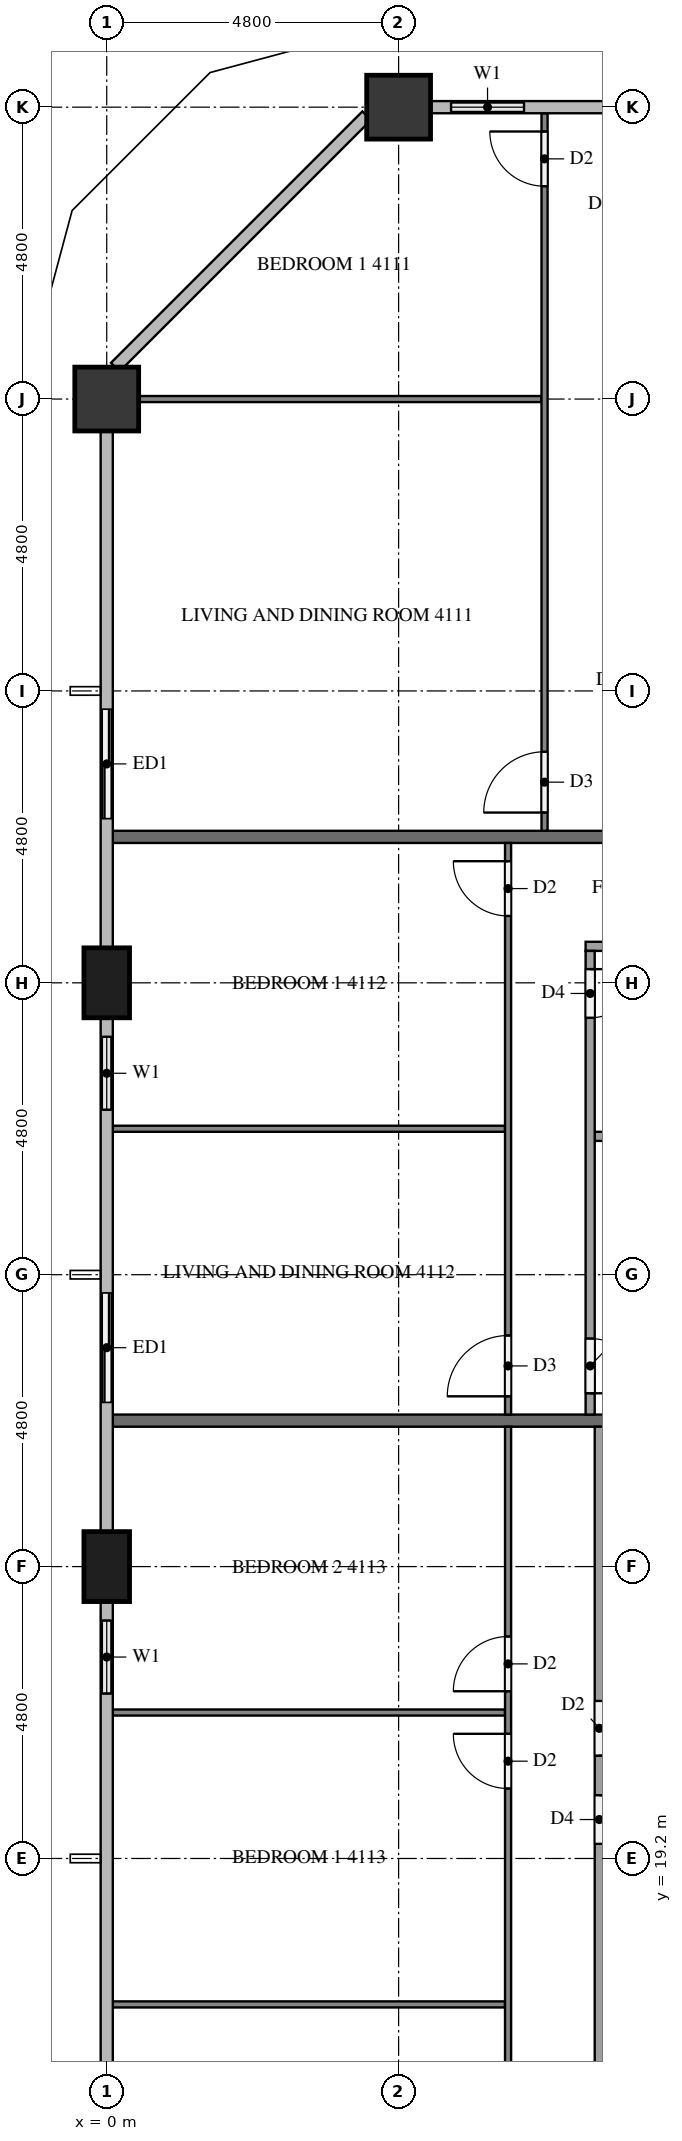
"""IFC4 building model, lengths in metres.
Left out: names, types, materials, properties, quantities, classifications, styles, units other than length and angle.
Written with IfcOpenShell. Run it as: python <this file> out.ifc"""

import sys

from ifc_helpers import new_model, si_unit, direction, frame, frame_2d, origin, origin_2d, place, context, subcontext, project, spatial, rectangle, extrude, element, fill, save


model = new_model("IFC4")
c1 = context("Model", 3, precision=1e-05, world=origin(), true_north=direction((0.0, 1.0)))
c2 = subcontext(c1, "Body", "Model", "MODEL_VIEW")
j1 = project(units=[si_unit("LENGTHUNIT", "METRE"), si_unit("PLANEANGLEUNIT", "RADIAN")], contexts=[c1])
p1 = place(None, origin())
s1 = spatial("IfcSite", under=j1, at=p1, CompositionType="ELEMENT")
p2 = place(p1, origin())
s2 = spatial("IfcBuilding", under=s1, at=p2, CompositionType="ELEMENT")
p3 = place(p2, frame((0.0, 0.0, 159.5)))
s3 = spatial("IfcBuildingStorey", under=s2, at=p3, CompositionType="ELEMENT", Elevation=159.5)
for number, where, z_axis, x_axis in (
    (1, (4.8, 48.0, 0.0), (0.0, 0.0, 1.0), (1.0, 0.0, 0.0)),
    (2, (0.0, 43.2, 0.0), (0.0, 0.0, 1.0), (1.0, 0.0, 0.0)),
):
    element("IfcColumn", number, at=place(p3, frame(where, z_axis=z_axis, x_axis=x_axis)), inside=s3, PredefinedType="COLUMN", context=c2, shape_type="SweptSolid", body=[
        extrude(rectangle(XDim=1.05, YDim=1.05, at=origin_2d()), origin(), (0.0, 0.0, 1.0), 3.2),
    ])
for number, where, z_axis, x_axis in (
    (3, (0.0, 33.6, 0.0), (0.0, 0.0, 1.0), (0.0, 1.0, 0.0)),
    (4, (0.0, 24.0, 0.0), (0.0, 0.0, 1.0), (0.0, 1.0, 0.0)),
):
    element("IfcColumn", number, at=place(p3, frame(where, z_axis=z_axis, x_axis=x_axis)), inside=s3, PredefinedType="COLUMN", context=c2, shape_type="SweptSolid", body=[
        extrude(rectangle(XDim=1.15, YDim=0.75, at=origin_2d()), origin(), (0.0, 0.0, 1.0), 3.2),
    ])
p4 = place(p3, frame((7.2, 48.0, 0.0), z_axis=(0.0, 0.0, 1.0), x_axis=(-1.0, 0.0, 0.0)))
e5 = element("IfcWall", 5, at=p4, inside=s3, PredefinedType="SOLIDWALL", context=c2, shape_type="SweptSolid", body=[
    extrude(rectangle(XDim=1.875, YDim=0.15, at=frame_2d((0.938, 0.0))), origin(), (0.0, 0.0, 1.0), 3.2),
])
p5 = place(p4, frame((0.337, 0.0, 0.9)))
e6 = element("IfcOpeningElement", 6, at=p5, cuts=e5, PredefinedType="OPENING", context=c2, shape_type="SweptSolid", body=[
    extrude(rectangle(XDim=1.2, YDim=1.4, at=frame_2d((0.6, 0.7))), frame((0.0, 0.085, 0.0), z_axis=(0.0, -1.0, 0.0), x_axis=(1.0, 0.0, 0.0)), (0.0, 0.0, 1.0), 0.17),
])
p6 = place(p3, frame((0.0, 38.4, 0.0), z_axis=(0.0, 0.0, 1.0), x_axis=(0.0, -1.0, 0.0)))
e7 = element("IfcWall", 7, at=p6, inside=s3, PredefinedType="SOLIDWALL", context=c2, shape_type="SweptSolid", body=[
    extrude(rectangle(XDim=2.4, YDim=0.15, at=frame_2d((1.2, 0.0))), origin(), (0.0, 0.0, 1.0), 3.2),
])
p7 = place(p6, frame((0.3, 0.0, 0.0)))
e8 = element("IfcOpeningElement", 8, at=p7, cuts=e7, PredefinedType="OPENING", context=c2, shape_type="SweptSolid", body=[
    extrude(rectangle(XDim=1.8, YDim=2.4, at=frame_2d((0.9, 1.2))), frame((0.0, 0.085, 0.0), z_axis=(0.0, -1.0, 0.0), x_axis=(1.0, 0.0, 0.0)), (0.0, 0.0, 1.0), 0.17),
])
p8 = place(p3, frame((0.0, 33.025, 0.0), z_axis=(0.0, 0.0, 1.0), x_axis=(0.0, -1.0, 0.0)))
e9 = element("IfcWall", 9, at=p8, inside=s3, PredefinedType="SOLIDWALL", context=c2, shape_type="SweptSolid", body=[
    extrude(rectangle(XDim=1.825, YDim=0.15, at=frame_2d((0.913, 0.0))), origin(), (0.0, 0.0, 1.0), 3.2),
])
p9 = place(p8, frame((0.312, 0.0, 0.9)))
e10 = element("IfcOpeningElement", 10, at=p9, cuts=e9, PredefinedType="OPENING", context=c2, shape_type="SweptSolid", body=[
    extrude(rectangle(XDim=1.2, YDim=1.4, at=frame_2d((0.6, 0.7))), frame((0.0, 0.085, 0.0), z_axis=(0.0, -1.0, 0.0), x_axis=(1.0, 0.0, 0.0)), (0.0, 0.0, 1.0), 0.17),
])
p10 = place(p3, frame((0.0, 28.8, 0.0), z_axis=(0.0, 0.0, 1.0), x_axis=(0.0, -1.0, 0.0)))
e11 = element("IfcWall", 11, at=p10, inside=s3, PredefinedType="SOLIDWALL", context=c2, shape_type="SweptSolid", body=[
    extrude(rectangle(XDim=2.4, YDim=0.15, at=frame_2d((1.2, 0.0))), origin(), (0.0, 0.0, 1.0), 3.2),
])
p11 = place(p10, frame((0.3, 0.0, 0.0)))
e12 = element("IfcOpeningElement", 12, at=p11, cuts=e11, PredefinedType="OPENING", context=c2, shape_type="SweptSolid", body=[
    extrude(rectangle(XDim=1.8, YDim=2.4, at=frame_2d((0.9, 1.2))), frame((0.0, 0.085, 0.0), z_axis=(0.0, -1.0, 0.0), x_axis=(1.0, 0.0, 0.0)), (0.0, 0.0, 1.0), 0.17),
])
p12 = place(p3, frame((0.0, 23.425, 0.0), z_axis=(0.0, 0.0, 1.0), x_axis=(0.0, -1.0, 0.0)))
e13 = element("IfcWall", 13, at=p12, inside=s3, PredefinedType="SOLIDWALL", context=c2, shape_type="SweptSolid", body=[
    extrude(rectangle(XDim=1.825, YDim=0.15, at=frame_2d((0.913, 0.0))), origin(), (0.0, 0.0, 1.0), 3.2),
])
p13 = place(p12, frame((0.312, 0.0, 0.9)))
e14 = element("IfcOpeningElement", 14, at=p13, cuts=e13, PredefinedType="OPENING", context=c2, shape_type="SweptSolid", body=[
    extrude(rectangle(XDim=1.2, YDim=1.4, at=frame_2d((0.6, 0.7))), frame((0.0, 0.085, 0.0), z_axis=(0.0, -1.0, 0.0), x_axis=(1.0, 0.0, 0.0)), (0.0, 0.0, 1.0), 0.17),
])
for number, where, z_axis, x_axis in (
    (15, (0.1, 36.0, 0.0), (0.0, 0.0, 1.0), (1.0, 0.0, 0.0)),
    (16, (0.1, 26.4, 0.0), (0.0, 0.0, 1.0), (1.0, 0.0, 0.0)),
):
    element("IfcWall", number, at=place(p3, frame(where, z_axis=z_axis, x_axis=x_axis)), inside=s3, PredefinedType="PARTITIONING", context=c2, shape_type="SweptSolid", body=[
        extrude(rectangle(XDim=11.8, YDim=0.2, at=frame_2d((5.9, 0.0))), origin(), (0.0, 0.0, 1.0), 3.2),
    ])
p14 = place(p3, frame((7.15, 43.2, 0.0), z_axis=(0.0, 0.0, 1.0), x_axis=(-1.0, 0.0, 0.0)))
e17 = element("IfcWall", 17, at=p14, inside=s3, PredefinedType="PARTITIONING", context=c2, shape_type="SweptSolid", body=[
    extrude(rectangle(XDim=6.625, YDim=0.1, at=frame_2d((3.312, 0.0))), origin(), (0.0, 0.0, 1.0), 3.2),
])
p15 = place(p3, frame((7.2, 36.1, 0.0), z_axis=(0.0, 0.0, 1.0), x_axis=(0.0, 1.0, 0.0)))
e18 = element("IfcWall", 18, at=p15, inside=s3, PredefinedType="PARTITIONING", context=c2, shape_type="SweptSolid", body=[
    extrude(rectangle(XDim=11.8, YDim=0.1, at=frame_2d((5.9, 0.0))), origin(), (0.0, 0.0, 1.0), 3.2),
])
p16 = place(p15, frame((0.3, 0.0, 0.0)))
e19 = element("IfcOpeningElement", 19, at=p16, cuts=e18, PredefinedType="OPENING", context=c2, shape_type="SweptSolid", body=[
    extrude(rectangle(XDim=1.0, YDim=2.1, at=frame_2d((0.5, 1.05))), frame((0.0, 0.06, 0.0), z_axis=(0.0, -1.0, 0.0), x_axis=(1.0, 0.0, 0.0)), (0.0, 0.0, 1.0), 0.12),
])
p17 = place(p15, frame((10.6, 0.0, 0.0)))
e20 = element("IfcOpeningElement", 20, at=p17, cuts=e18, PredefinedType="OPENING", context=c2, shape_type="SweptSolid", body=[
    extrude(rectangle(XDim=0.9, YDim=2.1, at=frame_2d((0.45, 1.05))), frame((0.0, 0.06, 0.0), z_axis=(0.0, -1.0, 0.0), x_axis=(1.0, 0.0, 0.0)), (0.0, 0.0, 1.0), 0.12),
])
p18 = place(p3, frame((6.55, 31.2, 0.0), z_axis=(0.0, 0.0, 1.0), x_axis=(-1.0, 0.0, 0.0)))
e21 = element("IfcWall", 21, at=p18, inside=s3, PredefinedType="PARTITIONING", context=c2, shape_type="SweptSolid", body=[
    extrude(rectangle(XDim=6.45, YDim=0.1, at=frame_2d((3.225, 0.0))), origin(), (0.0, 0.0, 1.0), 3.2),
])
p19 = place(p3, frame((6.6, 26.5, 0.0), z_axis=(0.0, 0.0, 1.0), x_axis=(0.0, 1.0, 0.0)))
e22 = element("IfcWall", 22, at=p19, inside=s3, PredefinedType="PARTITIONING", context=c2, shape_type="SweptSolid", body=[
    extrude(rectangle(XDim=9.4, YDim=0.1, at=frame_2d((4.7, 0.0))), origin(), (0.0, 0.0, 1.0), 3.2),
])
p20 = place(p19, frame((8.2, 0.0, 0.0)))
e23 = element("IfcOpeningElement", 23, at=p20, cuts=e22, PredefinedType="OPENING", context=c2, shape_type="SweptSolid", body=[
    extrude(rectangle(XDim=0.9, YDim=2.1, at=frame_2d((0.45, 1.05))), frame((0.0, 0.06, 0.0), z_axis=(0.0, -1.0, 0.0), x_axis=(1.0, 0.0, 0.0)), (0.0, 0.0, 1.0), 0.12),
])
p21 = place(p19, frame((0.3, 0.0, 0.0)))
e24 = element("IfcOpeningElement", 24, at=p21, cuts=e22, PredefinedType="OPENING", context=c2, shape_type="SweptSolid", body=[
    extrude(rectangle(XDim=1.0, YDim=2.1, at=frame_2d((0.5, 1.05))), frame((0.0, 0.06, 0.0), z_axis=(0.0, -1.0, 0.0), x_axis=(1.0, 0.0, 0.0)), (0.0, 0.0, 1.0), 0.12),
])
p22 = place(p3, frame((11.9, 31.075, 0.0), z_axis=(0.0, 0.0, 1.0), x_axis=(-1.0, 0.0, 0.0)))
e25 = element("IfcWall", 25, at=p22, inside=s3, PredefinedType="PARTITIONING", context=c2, shape_type="SweptSolid", body=[
    extrude(rectangle(XDim=3.875, YDim=0.15, at=frame_2d((1.938, 0.0))), origin(), (0.0, 0.0, 1.0), 3.2),
])
p23 = place(p3, frame((11.9, 34.2, 0.0), z_axis=(0.0, 0.0, 1.0), x_axis=(-1.0, 0.0, 0.0)))
e26 = element("IfcWall", 26, at=p23, inside=s3, PredefinedType="PARTITIONING", context=c2, shape_type="SweptSolid", body=[
    extrude(rectangle(XDim=4.025, YDim=0.15, at=frame_2d((2.012, 0.0))), origin(), (0.0, 0.0, 1.0), 3.2),
])
p24 = place(p3, frame((7.95, 34.125, 0.0), z_axis=(0.0, 0.0, 1.0), x_axis=(0.0, -1.0, 0.0)))
e27 = element("IfcWall", 27, at=p24, inside=s3, PredefinedType="PARTITIONING", context=c2, shape_type="SweptSolid", body=[
    extrude(rectangle(XDim=7.625, YDim=0.15, at=frame_2d((3.812, 0.0))), origin(), (0.0, 0.0, 1.0), 3.2),
])
p25 = place(p24, frame((0.3, 0.0, 0.0)))
e28 = element("IfcOpeningElement", 28, at=p25, cuts=e27, PredefinedType="OPENING", context=c2, shape_type="SweptSolid", body=[
    extrude(rectangle(XDim=0.8, YDim=2.1, at=frame_2d((0.4, 1.05))), frame((0.0, 0.085, 0.0), z_axis=(0.0, -1.0, 0.0), x_axis=(1.0, 0.0, 0.0)), (0.0, 0.0, 1.0), 0.17),
])
p26 = place(p24, frame((6.375, 0.0, 0.0)))
e29 = element("IfcOpeningElement", 29, at=p26, cuts=e27, PredefinedType="OPENING", context=c2, shape_type="SweptSolid", body=[
    extrude(rectangle(XDim=0.9, YDim=2.1, at=frame_2d((0.45, 1.05))), frame((0.0, 0.085, 0.0), z_axis=(0.0, -1.0, 0.0), x_axis=(1.0, 0.0, 0.0)), (0.0, 0.0, 1.0), 0.17),
])
for number, where, z_axis, x_axis in (
    (30, (6.55, 16.8, 0.0), (0.0, 0.0, 1.0), (-1.0, 0.0, 0.0)),
    (31, (6.55, 21.6, 0.0), (0.0, 0.0, 1.0), (-1.0, 0.0, 0.0)),
):
    element("IfcWall", number, at=place(p3, frame(where, z_axis=z_axis, x_axis=x_axis)), inside=s3, PredefinedType="PARTITIONING", context=c2, shape_type="SweptSolid", body=[
        extrude(rectangle(XDim=6.45, YDim=0.1, at=frame_2d((3.225, 0.0))), origin(), (0.0, 0.0, 1.0), 3.2),
    ])
p27 = place(p3, frame((6.6, 12.1, 0.0), z_axis=(0.0, 0.0, 1.0), x_axis=(0.0, 1.0, 0.0)))
e32 = element("IfcWall", 32, at=p27, inside=s3, PredefinedType="PARTITIONING", context=c2, shape_type="SweptSolid", body=[
    extrude(rectangle(XDim=14.2, YDim=0.1, at=frame_2d((7.1, 0.0))), origin(), (0.0, 0.0, 1.0), 3.2),
])
p28 = place(p27, frame((0.3, 0.0, 0.0)))
e33 = element("IfcOpeningElement", 33, at=p28, cuts=e32, PredefinedType="OPENING", context=c2, shape_type="SweptSolid", body=[
    extrude(rectangle(XDim=1.0, YDim=2.1, at=frame_2d((0.5, 1.05))), frame((0.0, 0.06, 0.0), z_axis=(0.0, -1.0, 0.0), x_axis=(1.0, 0.0, 0.0)), (0.0, 0.0, 1.0), 0.12),
])
p29 = place(p27, frame((8.25, 0.0, 0.0)))
e34 = element("IfcOpeningElement", 34, at=p29, cuts=e32, PredefinedType="OPENING", context=c2, shape_type="SweptSolid", body=[
    extrude(rectangle(XDim=0.9, YDim=2.1, at=frame_2d((0.45, 1.05))), frame((0.0, 0.06, 0.0), z_axis=(0.0, -1.0, 0.0), x_axis=(1.0, 0.0, 0.0)), (0.0, 0.0, 1.0), 0.12),
])
p30 = place(p27, frame((9.85, 0.0, 0.0)))
e35 = element("IfcOpeningElement", 35, at=p30, cuts=e32, PredefinedType="OPENING", context=c2, shape_type="SweptSolid", body=[
    extrude(rectangle(XDim=0.9, YDim=2.1, at=frame_2d((0.45, 1.05))), frame((0.0, 0.06, 0.0), z_axis=(0.0, -1.0, 0.0), x_axis=(1.0, 0.0, 0.0)), (0.0, 0.0, 1.0), 0.12),
])
p31 = place(p3, frame((8.1, 26.3, 0.0), z_axis=(0.0, 0.0, 1.0), x_axis=(0.0, -1.0, 0.0)))
e36 = element("IfcWall", 36, at=p31, inside=s3, PredefinedType="PARTITIONING", context=c2, shape_type="SweptSolid", body=[
    extrude(rectangle(XDim=12.425, YDim=0.15, at=frame_2d((6.212, 0.0))), origin(), (0.0, 0.0, 1.0), 3.2),
])
p32 = place(p31, frame((11.225, 0.0, 0.0)))
e37 = element("IfcOpeningElement", 37, at=p32, cuts=e36, PredefinedType="OPENING", context=c2, shape_type="SweptSolid", body=[
    extrude(rectangle(XDim=0.9, YDim=2.1, at=frame_2d((0.45, 1.05))), frame((0.0, 0.085, 0.0), z_axis=(0.0, -1.0, 0.0), x_axis=(1.0, 0.0, 0.0)), (0.0, 0.0, 1.0), 0.17),
])
p33 = place(p31, frame((6.06, 0.0, 0.0)))
e38 = element("IfcOpeningElement", 38, at=p33, cuts=e36, PredefinedType="OPENING", context=c2, shape_type="SweptSolid", body=[
    extrude(rectangle(XDim=0.8, YDim=2.1, at=frame_2d((0.4, 1.05))), frame((0.0, 0.085, 0.0), z_axis=(0.0, -1.0, 0.0), x_axis=(1.0, 0.0, 0.0)), (0.0, 0.0, 1.0), 0.17),
])
p34 = place(p31, frame((4.51, 0.0, 0.0)))
e39 = element("IfcOpeningElement", 39, at=p34, cuts=e36, PredefinedType="OPENING", context=c2, shape_type="SweptSolid", body=[
    extrude(rectangle(XDim=0.9, YDim=2.1, at=frame_2d((0.45, 1.05))), frame((0.0, 0.085, 0.0), z_axis=(0.0, -1.0, 0.0), x_axis=(1.0, 0.0, 0.0)), (0.0, 0.0, 1.0), 0.17),
])
p35 = place(p5, origin())
e40 = element("IfcWindow", 40, at=p35, inside=s3, PartitioningType="SINGLE_PANEL", PredefinedType="WINDOW", context=c2, shape_type="SweptSolid", body=[
    extrude(rectangle(XDim=1.2, YDim=1.4, at=frame_2d((0.6, 0.7))), frame((0.0, 0.03, 0.0), z_axis=(0.0, -1.0, 0.0), x_axis=(1.0, 0.0, 0.0)), (0.0, 0.0, 1.0), 0.06),
])
fill(e6, e40)
p36 = place(p7, origin())
e41 = element("IfcDoor", 41, at=p36, inside=s3, OperationType="SLIDING_TO_LEFT", PredefinedType="DOOR", context=c2, shape_type="SweptSolid", body=[
    extrude(rectangle(XDim=1.8, YDim=2.4, at=frame_2d((0.9, 1.2))), frame((0.0, 0.025, 0.0), z_axis=(0.0, -1.0, 0.0), x_axis=(1.0, 0.0, 0.0)), (0.0, 0.0, 1.0), 0.05),
])
fill(e8, e41)
p37 = place(p9, origin())
e42 = element("IfcWindow", 42, at=p37, inside=s3, PartitioningType="SINGLE_PANEL", PredefinedType="WINDOW", context=c2, shape_type="SweptSolid", body=[
    extrude(rectangle(XDim=1.2, YDim=1.4, at=frame_2d((0.6, 0.7))), frame((0.0, 0.03, 0.0), z_axis=(0.0, -1.0, 0.0), x_axis=(1.0, 0.0, 0.0)), (0.0, 0.0, 1.0), 0.06),
])
fill(e10, e42)
p38 = place(p11, origin())
e43 = element("IfcDoor", 43, at=p38, inside=s3, OperationType="SLIDING_TO_RIGHT", PredefinedType="DOOR", context=c2, shape_type="SweptSolid", body=[
    extrude(rectangle(XDim=1.8, YDim=2.4, at=frame_2d((0.9, 1.2))), frame((0.0, 0.025, 0.0), z_axis=(0.0, -1.0, 0.0), x_axis=(1.0, 0.0, 0.0)), (0.0, 0.0, 1.0), 0.05),
])
fill(e12, e43)
p39 = place(p13, origin())
e44 = element("IfcWindow", 44, at=p39, inside=s3, PartitioningType="SINGLE_PANEL", PredefinedType="WINDOW", context=c2, shape_type="SweptSolid", body=[
    extrude(rectangle(XDim=1.2, YDim=1.4, at=frame_2d((0.6, 0.7))), frame((0.0, 0.03, 0.0), z_axis=(0.0, -1.0, 0.0), x_axis=(1.0, 0.0, 0.0)), (0.0, 0.0, 1.0), 0.06),
])
fill(e14, e44)
p40 = place(p16, origin())
e45 = element("IfcDoor", 45, at=p40, inside=s3, OperationType="SINGLE_SWING_LEFT", PredefinedType="DOOR", context=c2, shape_type="SweptSolid", body=[
    extrude(rectangle(XDim=1.0, YDim=2.1, at=frame_2d((0.5, 1.05))), frame((0.0, 0.025, 0.0), z_axis=(0.0, -1.0, 0.0), x_axis=(1.0, 0.0, 0.0)), (0.0, 0.0, 1.0), 0.05),
])
fill(e19, e45)
p41 = place(p17, origin())
e46 = element("IfcDoor", 46, at=p41, inside=s3, OperationType="SINGLE_SWING_RIGHT", PredefinedType="DOOR", context=c2, shape_type="SweptSolid", body=[
    extrude(rectangle(XDim=0.9, YDim=2.1, at=frame_2d((0.45, 1.05))), frame((0.0, 0.025, 0.0), z_axis=(0.0, -1.0, 0.0), x_axis=(1.0, 0.0, 0.0)), (0.0, 0.0, 1.0), 0.05),
])
fill(e20, e46)
p42 = place(p20, origin())
e47 = element("IfcDoor", 47, at=p42, inside=s3, OperationType="SINGLE_SWING_RIGHT", PredefinedType="DOOR", context=c2, shape_type="SweptSolid", body=[
    extrude(rectangle(XDim=0.9, YDim=2.1, at=frame_2d((0.45, 1.05))), frame((0.0, 0.025, 0.0), z_axis=(0.0, -1.0, 0.0), x_axis=(1.0, 0.0, 0.0)), (0.0, 0.0, 1.0), 0.05),
])
fill(e23, e47)
p43 = place(p21, origin())
e48 = element("IfcDoor", 48, at=p43, inside=s3, OperationType="SINGLE_SWING_LEFT", PredefinedType="DOOR", context=c2, shape_type="SweptSolid", body=[
    extrude(rectangle(XDim=1.0, YDim=2.1, at=frame_2d((0.5, 1.05))), frame((0.0, 0.025, 0.0), z_axis=(0.0, -1.0, 0.0), x_axis=(1.0, 0.0, 0.0)), (0.0, 0.0, 1.0), 0.05),
])
fill(e24, e48)
p44 = place(p25, origin())
e49 = element("IfcDoor", 49, at=p44, inside=s3, OperationType="SINGLE_SWING_LEFT", PredefinedType="DOOR", context=c2, shape_type="SweptSolid", body=[
    extrude(rectangle(XDim=0.8, YDim=2.1, at=frame_2d((0.4, 1.05))), frame((0.0, 0.025, 0.0), z_axis=(0.0, -1.0, 0.0), x_axis=(1.0, 0.0, 0.0)), (0.0, 0.0, 1.0), 0.05),
])
fill(e28, e49)
p45 = place(p26, origin())
e50 = element("IfcDoor", 50, at=p45, inside=s3, OperationType="SINGLE_SWING_RIGHT", PredefinedType="DOOR", context=c2, shape_type="SweptSolid", body=[
    extrude(rectangle(XDim=0.9, YDim=2.1, at=frame_2d((0.45, 1.05))), frame((0.0, 0.025, 0.0), z_axis=(0.0, -1.0, 0.0), x_axis=(1.0, 0.0, 0.0)), (0.0, 0.0, 1.0), 0.05),
])
fill(e29, e50)
p46 = place(p29, origin())
e51 = element("IfcDoor", 51, at=p46, inside=s3, OperationType="SINGLE_SWING_RIGHT", PredefinedType="DOOR", context=c2, shape_type="SweptSolid", body=[
    extrude(rectangle(XDim=0.9, YDim=2.1, at=frame_2d((0.45, 1.05))), frame((0.0, 0.025, 0.0), z_axis=(0.0, -1.0, 0.0), x_axis=(1.0, 0.0, 0.0)), (0.0, 0.0, 1.0), 0.05),
])
fill(e34, e51)
p47 = place(p30, origin())
e52 = element("IfcDoor", 52, at=p47, inside=s3, OperationType="SINGLE_SWING_LEFT", PredefinedType="DOOR", context=c2, shape_type="SweptSolid", body=[
    extrude(rectangle(XDim=0.9, YDim=2.1, at=frame_2d((0.45, 1.05))), frame((0.0, 0.025, 0.0), z_axis=(0.0, -1.0, 0.0), x_axis=(1.0, 0.0, 0.0)), (0.0, 0.0, 1.0), 0.05),
])
fill(e35, e52)
p48 = place(p33, origin())
e53 = element("IfcDoor", 53, at=p48, inside=s3, OperationType="SINGLE_SWING_LEFT", PredefinedType="DOOR", context=c2, shape_type="SweptSolid", body=[
    extrude(rectangle(XDim=0.8, YDim=2.1, at=frame_2d((0.4, 1.05))), frame((0.0, 0.025, 0.0), z_axis=(0.0, -1.0, 0.0), x_axis=(1.0, 0.0, 0.0)), (0.0, 0.0, 1.0), 0.05),
])
fill(e38, e53)
p49 = place(p34, origin())
e54 = element("IfcDoor", 54, at=p49, inside=s3, OperationType="SINGLE_SWING_RIGHT", PredefinedType="DOOR", context=c2, shape_type="SweptSolid", body=[
    extrude(rectangle(XDim=0.9, YDim=2.1, at=frame_2d((0.45, 1.05))), frame((0.0, 0.025, 0.0), z_axis=(0.0, -1.0, 0.0), x_axis=(1.0, 0.0, 0.0)), (0.0, 0.0, 1.0), 0.05),
])
fill(e39, e54)
save(model, sys.argv[1])
